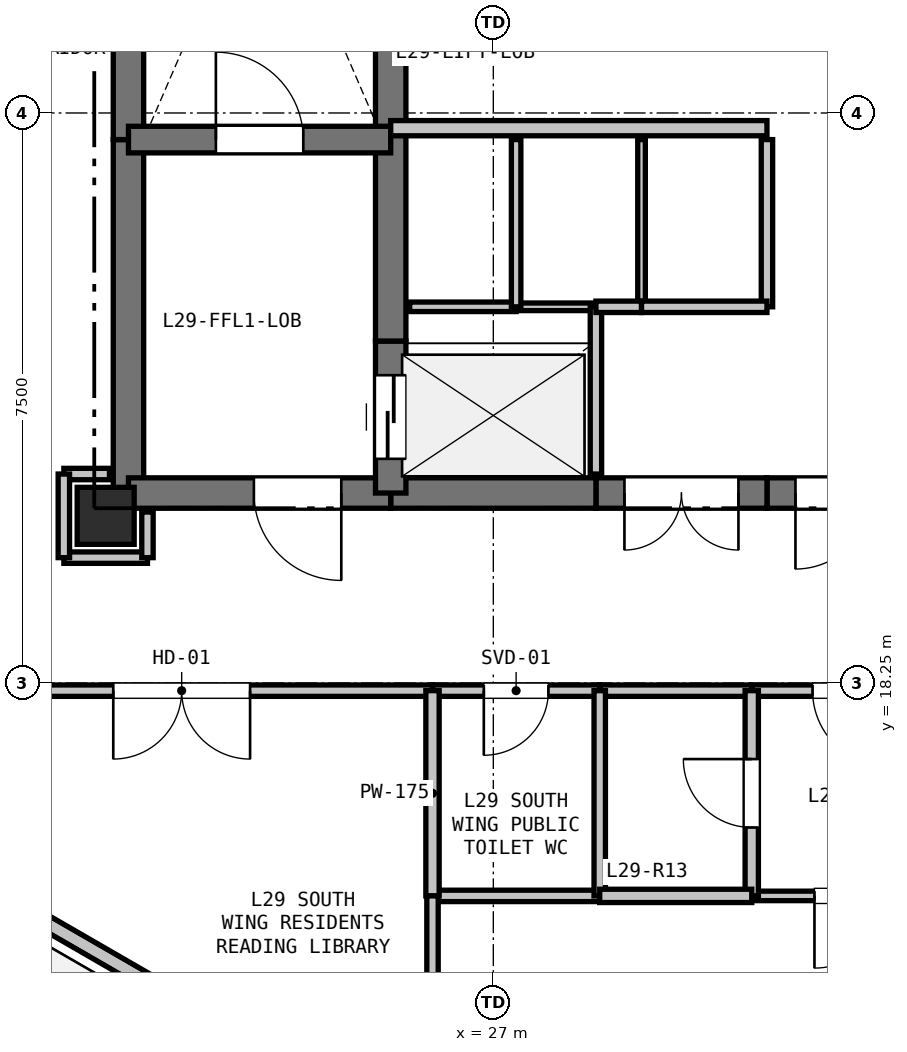
"""IFC4 building model, lengths in metres.
Left out: names, types, materials, properties, quantities, classifications, styles, units other than length and angle.
Written with IfcOpenShell. Run it as: python <this file> out.ifc"""

import sys

from ifc_helpers import new_model, si_unit, direction, frame, frame_2d, origin, origin_2d, place, context, subcontext, project, spatial, rectangle, extrude, element, fill, save


model = new_model("IFC4")
c1 = context("Model", 3, precision=1e-05, world=origin(), true_north=direction((0.0, 1.0)))
c2 = subcontext(c1, "Body", "Model", "MODEL_VIEW")
j1 = project(units=[si_unit("LENGTHUNIT", "METRE"), si_unit("PLANEANGLEUNIT", "RADIAN")], contexts=[c1])
p1 = place(None, origin())
s1 = spatial("IfcSite", under=j1, at=p1, CompositionType="ELEMENT")
p2 = place(p1, origin())
s2 = spatial("IfcBuilding", under=s1, at=p2, CompositionType="ELEMENT")
p3 = place(p2, frame((0.0, 0.0, 106.5)))
s3 = spatial("IfcBuildingStorey", under=s2, at=p3, CompositionType="ELEMENT", Elevation=106.5)
p4 = place(p3, frame((21.9, 20.45, 0.0), z_axis=(0.0, 0.0, 1.0), x_axis=(1.0, 0.0, 0.0)))
e1 = element("IfcColumn", 1, at=p4, inside=s3, PredefinedType="COLUMN", context=c2, shape_type="SweptSolid", body=[
    extrude(rectangle(XDim=0.75, YDim=0.75, at=origin_2d()), origin(), (0.0, 0.0, 1.0), 3.3),
])
p5 = place(p3, frame((26.845, 11.788, 0.0), z_axis=(0.0, 0.0, 1.0), x_axis=(-0.866027010039, 0.499997217876, 0.0)))
e2 = element("IfcWall", 2, at=p5, inside=s3, PredefinedType="PARAPET", context=c2, shape_type="SweptSolid", body=[
    extrude(rectangle(XDim=11.229, YDim=0.2, at=frame_2d((5.615, 0.0))), origin(), (0.0, 0.0, 1.0), 0.2),
])
p6 = place(p3, frame((22.2, 20.75, 0.0), z_axis=(0.0, 0.0, 1.0), x_axis=(0.0, 1.0, 0.0)))
e3 = element("IfcWall", 3, at=p6, inside=s3, PredefinedType="SHEAR", context=c2, shape_type="SweptSolid", body=[
    extrude(rectangle(XDim=4.65, YDim=0.4, at=frame_2d((2.325, 0.0))), origin(), (0.0, 0.0, 1.0), 3.05),
])
p7 = place(p3, frame((22.2, 25.4, 0.0), z_axis=(0.0, 0.0, 1.0), x_axis=(0.0, 1.0, 0.0)))
e4 = element("IfcWall", 4, at=p7, inside=s3, PredefinedType="SHEAR", context=c2, shape_type="SweptSolid", body=[
    extrude(rectangle(XDim=7.35, YDim=0.4, at=frame_2d((3.675, 0.0))), origin(), (0.0, 0.0, 1.0), 3.05),
])
p8 = place(p3, frame((32.35, 20.75, 0.0), z_axis=(0.0, 0.0, 1.0), x_axis=(-1.0, 0.0, 0.0)))
e5 = element("IfcWall", 5, at=p8, inside=s3, PredefinedType="SHEAR", context=c2, shape_type="SweptSolid", body=[
    extrude(rectangle(XDim=1.75, YDim=0.4, at=frame_2d((0.875, 0.0))), origin(), (0.0, 0.0, 1.0), 3.05),
])
p9 = place(p8, frame((0.375, 0.0, 0.0)))
e6 = element("IfcOpeningElement", 6, at=p9, cuts=e5, PredefinedType="OPENING", context=c2, shape_type="SweptSolid", body=[
    extrude(rectangle(XDim=1.0, YDim=2.15, at=frame_2d((0.5, 1.075))), frame((0.0, 0.21, 0.0), z_axis=(0.0, -1.0, 0.0), x_axis=(1.0, 0.0, 0.0)), (0.0, 0.0, 1.0), 0.42),
])
p10 = place(p3, frame((30.6, 20.75, 0.0), z_axis=(0.0, 0.0, 1.0), x_axis=(-1.0, 0.0, 0.0)))
e7 = element("IfcWall", 7, at=p10, inside=s3, PredefinedType="SHEAR", context=c2, shape_type="SweptSolid", body=[
    extrude(rectangle(XDim=2.25, YDim=0.4, at=frame_2d((1.125, 0.0))), origin(), (0.0, 0.0, 1.0), 3.05),
])
p11 = place(p10, frame((0.375, 0.0, 0.0)))
e8 = element("IfcOpeningElement", 8, at=p11, cuts=e7, PredefinedType="OPENING", context=c2, shape_type="SweptSolid", body=[
    extrude(rectangle(XDim=1.5, YDim=2.2, at=frame_2d((0.75, 1.1))), frame((0.0, 0.21, 0.0), z_axis=(0.0, -1.0, 0.0), x_axis=(1.0, 0.0, 0.0)), (0.0, 0.0, 1.0), 0.42),
])
p12 = place(p3, frame((28.35, 20.75, 0.0), z_axis=(0.0, 0.0, 1.0), x_axis=(-1.0, 0.0, 0.0)))
e9 = element("IfcWall", 9, at=p12, inside=s3, PredefinedType="SHEAR", context=c2, shape_type="SweptSolid", body=[
    extrude(rectangle(XDim=2.7, YDim=0.4, at=frame_2d((1.35, 0.0))), origin(), (0.0, 0.0, 1.0), 3.05),
])
p13 = place(p3, frame((25.65, 20.75, 0.0), z_axis=(0.0, 0.0, 1.0), x_axis=(-1.0, 0.0, 0.0)))
e10 = element("IfcWall", 10, at=p13, inside=s3, PredefinedType="SHEAR", context=c2, shape_type="SweptSolid", body=[
    extrude(rectangle(XDim=3.45, YDim=0.4, at=frame_2d((1.725, 0.0))), origin(), (0.0, 0.0, 1.0), 3.05),
])
p14 = place(p13, frame((0.65, 0.0, 0.0)))
e11 = element("IfcOpeningElement", 11, at=p14, cuts=e10, PredefinedType="OPENING", context=c2, shape_type="SweptSolid", body=[
    extrude(rectangle(XDim=1.15, YDim=2.15, at=frame_2d((0.575, 1.075))), frame((0.0, 0.21, 0.0), z_axis=(0.0, -1.0, 0.0), x_axis=(1.0, 0.0, 0.0)), (0.0, 0.0, 1.0), 0.42),
])
p15 = place(p3, frame((25.65, 20.75, 0.0), z_axis=(0.0, 0.0, 1.0), x_axis=(0.0, 1.0, 0.0)))
e12 = element("IfcWall", 12, at=p15, inside=s3, PredefinedType="SHEAR", context=c2, shape_type="SweptSolid", body=[
    extrude(rectangle(XDim=2.0, YDim=0.4, at=frame_2d((1.0, 0.0))), origin(), (0.0, 0.0, 1.0), 3.05),
])
p16 = place(p15, frame((0.45, 0.0, 0.0)))
e13 = element("IfcOpeningElement", 13, at=p16, cuts=e12, PredefinedType="OPENING", context=c2, shape_type="SweptSolid", body=[
    extrude(rectangle(XDim=1.1, YDim=2.15, at=frame_2d((0.55, 1.075))), frame((0.0, 0.21, 0.0), z_axis=(0.0, -1.0, 0.0), x_axis=(1.0, 0.0, 0.0)), (0.0, 0.0, 1.0), 0.42),
])
p17 = place(p3, frame((25.65, 22.75, 0.0), z_axis=(0.0, 0.0, 1.0), x_axis=(0.0, 1.0, 0.0)))
e14 = element("IfcWall", 14, at=p17, inside=s3, PredefinedType="SHEAR", context=c2, shape_type="SweptSolid", body=[
    extrude(rectangle(XDim=2.8, YDim=0.4, at=frame_2d((1.4, 0.0))), origin(), (0.0, 0.0, 1.0), 3.05),
])
p18 = place(p3, frame((25.65, 25.55, 0.0), z_axis=(0.0, 0.0, 1.0), x_axis=(0.0, 1.0, 0.0)))
e15 = element("IfcWall", 15, at=p18, inside=s3, PredefinedType="SHEAR", context=c2, shape_type="SweptSolid", body=[
    extrude(rectangle(XDim=2.4, YDim=0.4, at=frame_2d((1.2, 0.0))), origin(), (0.0, 0.0, 1.0), 3.05),
])
p19 = place(p3, frame((22.2, 25.4, 0.0), z_axis=(0.0, 0.0, 1.0), x_axis=(1.0, 0.0, 0.0)))
e16 = element("IfcWall", 16, at=p19, inside=s3, PredefinedType="SHEAR", context=c2, shape_type="SweptSolid", body=[
    extrude(rectangle(XDim=3.45, YDim=0.35, at=frame_2d((1.725, 0.0))), origin(), (0.0, 0.0, 1.0), 3.05),
])
p20 = place(p19, frame((1.15, 0.0, 0.0)))
e17 = element("IfcOpeningElement", 17, at=p20, cuts=e16, PredefinedType="OPENING", context=c2, shape_type="SweptSolid", body=[
    extrude(rectangle(XDim=1.15, YDim=2.15, at=frame_2d((0.575, 1.075))), frame((0.0, 0.185, 0.0), z_axis=(0.0, -1.0, 0.0), x_axis=(1.0, 0.0, 0.0)), (0.0, 0.0, 1.0), 0.37),
])
p21 = place(p3, frame((25.65, 25.55, 0.0), z_axis=(0.0, 0.0, 1.0), x_axis=(1.0, 0.0, 0.0)))
e18 = element("IfcWall", 18, at=p21, inside=s3, PredefinedType="PARTITIONING", context=c2, shape_type="SweptSolid", body=[
    extrude(rectangle(XDim=4.95, YDim=0.2, at=frame_2d((2.475, 0.0))), origin(), (0.0, 0.0, 1.0), 3.05),
])
p22 = place(p3, frame((25.9, 23.2, 0.0), z_axis=(0.0, 0.0, 1.0), x_axis=(1.0, 0.0, 0.0)))
e19 = element("IfcWall", 19, at=p22, inside=s3, PredefinedType="PARTITIONING", context=c2, shape_type="SweptSolid", body=[
    extrude(rectangle(XDim=1.4, YDim=0.125, at=frame_2d((0.7, 0.0))), origin(), (0.0, 0.0, 1.0), 3.05),
])
p23 = place(p3, frame((27.3, 23.2, 0.0), z_axis=(0.0, 0.0, 1.0), x_axis=(1.0, 0.0, 0.0)))
e20 = element("IfcWall", 20, at=p23, inside=s3, PredefinedType="PARTITIONING", context=c2, shape_type="SweptSolid", body=[
    extrude(rectangle(XDim=1.05, YDim=0.1, at=frame_2d((0.525, 0.0))), origin(), (0.0, 0.0, 1.0), 3.05),
])
p24 = place(p3, frame((28.35, 23.2, 0.0), z_axis=(0.0, 0.0, 1.0), x_axis=(0.0, -1.0, 0.0)))
e21 = element("IfcWall", 21, at=p24, inside=s3, PredefinedType="PARTITIONING", context=c2, shape_type="SweptSolid", body=[
    extrude(rectangle(XDim=2.2, YDim=0.15, at=frame_2d((1.1, 0.0))), origin(), (0.0, 0.0, 1.0), 3.05),
])
p25 = place(p3, frame((27.3, 25.4, 0.0), z_axis=(0.0, 0.0, 1.0), x_axis=(0.0, -1.0, 0.0)))
e22 = element("IfcWall", 22, at=p25, inside=s3, PredefinedType="PARTITIONING", context=c2, shape_type="SweptSolid", body=[
    extrude(rectangle(XDim=2.2, YDim=0.125, at=frame_2d((1.1, 0.0))), origin(), (0.0, 0.0, 1.0), 3.05),
])
p26 = place(p3, frame((28.95, 25.4, 0.0), z_axis=(0.0, 0.0, 1.0), x_axis=(0.0, -1.0, 0.0)))
e23 = element("IfcWall", 23, at=p26, inside=s3, PredefinedType="PARTITIONING", context=c2, shape_type="SweptSolid", body=[
    extrude(rectangle(XDim=2.2, YDim=0.1, at=frame_2d((1.1, 0.0))), origin(), (0.0, 0.0, 1.0), 3.05),
])
p27 = place(p3, frame((28.95, 23.2, 0.0), z_axis=(0.0, 0.0, 1.0), x_axis=(-1.0, 0.0, 0.0)))
e24 = element("IfcWall", 24, at=p27, inside=s3, PredefinedType="PARTITIONING", context=c2, shape_type="SweptSolid", body=[
    extrude(rectangle(XDim=0.6, YDim=0.15, at=frame_2d((0.3, 0.0))), origin(), (0.0, 0.0, 1.0), 3.05),
])
p28 = place(p3, frame((30.6, 25.4, 0.0), z_axis=(0.0, 0.0, 1.0), x_axis=(0.0, -1.0, 0.0)))
e25 = element("IfcWall", 25, at=p28, inside=s3, PredefinedType="PARTITIONING", context=c2, shape_type="SweptSolid", body=[
    extrude(rectangle(XDim=2.2, YDim=0.15, at=frame_2d((1.1, 0.0))), origin(), (0.0, 0.0, 1.0), 3.05),
])
p29 = place(p3, frame((30.6, 23.2, 0.0), z_axis=(0.0, 0.0, 1.0), x_axis=(-1.0, 0.0, 0.0)))
e26 = element("IfcWall", 26, at=p29, inside=s3, PredefinedType="PARTITIONING", context=c2, shape_type="SweptSolid", body=[
    extrude(rectangle(XDim=1.65, YDim=0.15, at=frame_2d((0.825, 0.0))), origin(), (0.0, 0.0, 1.0), 3.05),
])
p30 = place(p3, frame((21.35, 19.9, 0.0), z_axis=(0.0, 0.0, 1.0), x_axis=(1.0, 0.0, 0.0)))
e27 = element("IfcWall", 27, at=p30, inside=s3, PredefinedType="PARTITIONING", context=c2, shape_type="SweptSolid", body=[
    extrude(rectangle(XDim=1.1, YDim=0.15, at=frame_2d((0.55, 0.0))), origin(), (0.0, 0.0, 1.0), 2.423),
])
p31 = place(p3, frame((22.45, 19.9, 0.0), z_axis=(0.0, 0.0, 1.0), x_axis=(0.0, 1.0, 0.0)))
e28 = element("IfcWall", 28, at=p31, inside=s3, PredefinedType="PARTITIONING", context=c2, shape_type="SweptSolid", body=[
    extrude(rectangle(XDim=0.6, YDim=0.15, at=frame_2d((0.3, 0.0))), origin(), (0.0, 0.0, 1.0), 2.423),
])
p32 = place(p3, frame((33.0, 18.15, 0.0), z_axis=(0.0, 0.0, 1.0), x_axis=(-1.0, 0.0, 0.0)))
e29 = element("IfcWall", 29, at=p32, inside=s3, PredefinedType="PARTITIONING", context=c2, shape_type="SweptSolid", body=[
    extrude(rectangle(XDim=2.6, YDim=0.15, at=frame_2d((1.3, 0.0))), origin(), (0.0, 0.0, 1.0), 3.05),
])
p33 = place(p32, frame((0.8, 0.0, 0.0)))
e30 = element("IfcOpeningElement", 30, at=p33, cuts=e29, PredefinedType="OPENING", context=c2, shape_type="SweptSolid", body=[
    extrude(rectangle(XDim=1.0, YDim=2.15, at=frame_2d((0.5, 1.075))), frame((0.0, 0.085, 0.0), z_axis=(0.0, -1.0, 0.0), x_axis=(1.0, 0.0, 0.0)), (0.0, 0.0, 1.0), 0.17),
])
p34 = place(p3, frame((30.4, 18.15, 0.0), z_axis=(0.0, 0.0, 1.0), x_axis=(-1.0, 0.0, 0.0)))
e31 = element("IfcWall", 31, at=p34, inside=s3, PredefinedType="PARTITIONING", context=c2, shape_type="SweptSolid", body=[
    extrude(rectangle(XDim=2.0, YDim=0.15, at=frame_2d((1.0, 0.0))), origin(), (0.0, 0.0, 1.0), 3.05),
])
p35 = place(p3, frame((28.4, 18.15, 0.0), z_axis=(0.0, 0.0, 1.0), x_axis=(-1.0, 0.0, 0.0)))
e32 = element("IfcWall", 32, at=p35, inside=s3, PredefinedType="PARTITIONING", context=c2, shape_type="SweptSolid", body=[
    extrude(rectangle(XDim=2.2, YDim=0.15, at=frame_2d((1.1, 0.0))), origin(), (0.0, 0.0, 1.0), 3.05),
])
p36 = place(p35, frame((0.675, 0.0, 0.0)))
e33 = element("IfcOpeningElement", 33, at=p36, cuts=e32, PredefinedType="OPENING", context=c2, shape_type="SweptSolid", body=[
    extrude(rectangle(XDim=0.85, YDim=2.1, at=frame_2d((0.425, 1.05))), frame((0.0, 0.085, 0.0), z_axis=(0.0, -1.0, 0.0), x_axis=(1.0, 0.0, 0.0)), (0.0, 0.0, 1.0), 0.17),
])
p37 = place(p3, frame((26.2, 18.15, 0.0), z_axis=(0.0, 0.0, 1.0), x_axis=(-1.0, 0.0, 0.0)))
e34 = element("IfcWall", 34, at=p37, inside=s3, PredefinedType="PARTITIONING", context=c2, shape_type="SweptSolid", body=[
    extrude(rectangle(XDim=6.6, YDim=0.15, at=frame_2d((3.3, 0.0))), origin(), (0.0, 0.0, 1.0), 2.423),
])
p38 = place(p37, frame((2.4, 0.0, 0.0)))
e35 = element("IfcOpeningElement", 35, at=p38, cuts=e34, PredefinedType="OPENING", context=c2, shape_type="SweptSolid", body=[
    extrude(rectangle(XDim=1.8, YDim=2.2, at=frame_2d((0.9, 1.1))), frame((0.0, 0.085, 0.0), z_axis=(0.0, -1.0, 0.0), x_axis=(1.0, 0.0, 0.0)), (0.0, 0.0, 1.0), 0.17),
])
p39 = place(p3, frame((21.95, 21.0, 0.0), z_axis=(0.0, 0.0, 1.0), x_axis=(-1.0, 0.0, 0.0)))
e36 = element("IfcWall", 36, at=p39, inside=s3, PredefinedType="PARTITIONING", context=c2, shape_type="SweptSolid", body=[
    extrude(rectangle(XDim=0.6, YDim=0.15, at=frame_2d((0.3, 0.0))), origin(), (0.0, 0.0, 1.0), 2.498),
])
p40 = place(p3, frame((21.35, 21.0, 0.0), z_axis=(0.0, 0.0, 1.0), x_axis=(0.0, -1.0, 0.0)))
e37 = element("IfcWall", 37, at=p40, inside=s3, PredefinedType="PARTITIONING", context=c2, shape_type="SweptSolid", body=[
    extrude(rectangle(XDim=1.1, YDim=0.15, at=frame_2d((0.55, 0.0))), origin(), (0.0, 0.0, 1.0), 2.423),
])
p41 = place(p3, frame((33.0, 15.45, 0.0), z_axis=(0.0, 0.0, 1.0), x_axis=(-1.0, 0.0, 0.0)))
e38 = element("IfcWall", 38, at=p41, inside=s3, PredefinedType="PARTITIONING", context=c2, shape_type="SweptSolid", body=[
    extrude(rectangle(XDim=2.6, YDim=0.125, at=frame_2d((1.3, 0.0))), origin(), (0.0, 0.0, 1.0), 3.05),
])
p42 = place(p41, frame((0.825, 0.0, 0.0)))
e39 = element("IfcOpeningElement", 39, at=p42, cuts=e38, PredefinedType="OPENING", context=c2, shape_type="SweptSolid", body=[
    extrude(rectangle(XDim=0.95, YDim=2.1, at=frame_2d((0.475, 1.05))), frame((0.0, 0.073, 0.0), z_axis=(0.0, -1.0, 0.0), x_axis=(1.0, 0.0, 0.0)), (0.0, 0.0, 1.0), 0.145),
])
p43 = place(p3, frame((30.4, 15.45, 0.0), z_axis=(0.0, 0.0, 1.0), x_axis=(0.0, 1.0, 0.0)))
e40 = element("IfcWall", 40, at=p43, inside=s3, PredefinedType="PLUMBINGWALL", context=c2, shape_type="SweptSolid", body=[
    extrude(rectangle(XDim=2.7, YDim=0.175, at=frame_2d((1.35, 0.0))), origin(), (0.0, 0.0, 1.0), 3.05),
])
p44 = place(p43, frame((0.9, 0.0, 0.0)))
e41 = element("IfcOpeningElement", 41, at=p44, cuts=e40, PredefinedType="OPENING", context=c2, shape_type="SweptSolid", body=[
    extrude(rectangle(XDim=0.9, YDim=2.1, at=frame_2d((0.45, 1.05))), frame((0.0, 0.097, 0.0), z_axis=(0.0, -1.0, 0.0), x_axis=(1.0, 0.0, 0.0)), (0.0, 0.0, 1.0), 0.195),
])
p45 = place(p3, frame((28.4, 15.45, 0.0), z_axis=(0.0, 0.0, 1.0), x_axis=(-1.0, 0.0, 0.0)))
e42 = element("IfcWall", 42, at=p45, inside=s3, PredefinedType="PARTITIONING", context=c2, shape_type="SweptSolid", body=[
    extrude(rectangle(XDim=2.2, YDim=0.15, at=frame_2d((1.1, 0.0))), origin(), (0.0, 0.0, 1.0), 2.423),
])
p46 = place(p3, frame((26.2, 15.45, 0.0), z_axis=(0.0, 0.0, 1.0), x_axis=(0.0, 1.0, 0.0)))
e43 = element("IfcWall", 43, at=p46, inside=s3, PredefinedType="PLUMBINGWALL", context=c2, shape_type="SweptSolid", body=[
    extrude(rectangle(XDim=2.7, YDim=0.175, at=frame_2d((1.35, 0.0))), origin(), (0.0, 0.0, 1.0), 2.423),
])
p47 = place(p3, frame((28.4, 18.15, 0.0), z_axis=(0.0, 0.0, 1.0), x_axis=(0.0, -1.0, 0.0)))
e44 = element("IfcWall", 44, at=p47, inside=s3, PredefinedType="PARTITIONING", context=c2, shape_type="SweptSolid", body=[
    extrude(rectangle(XDim=2.7, YDim=0.15, at=frame_2d((1.35, 0.0))), origin(), (0.0, 0.0, 1.0), 3.05),
])
p48 = place(p3, frame((30.4, 15.45, 0.0), z_axis=(0.0, 0.0, 1.0), x_axis=(-1.0, 0.0, 0.0)))
e45 = element("IfcWall", 45, at=p48, inside=s3, PredefinedType="PLUMBINGWALL", context=c2, shape_type="SweptSolid", body=[
    extrude(rectangle(XDim=2.0, YDim=0.175, at=frame_2d((1.0, 0.0))), origin(), (0.0, 0.0, 1.0), 3.05),
])
p49 = place(p3, frame((26.2, 15.45, 0.0), z_axis=(0.0, 0.0, 1.0), x_axis=(0.0, -1.0, 0.0)))
e46 = element("IfcWall", 46, at=p49, inside=s3, PredefinedType="PARTITIONING", context=c2, shape_type="SweptSolid", body=[
    extrude(rectangle(XDim=3.248, YDim=0.15, at=frame_2d((1.624, 0.0))), origin(), (0.0, 0.0, 1.0), 2.365),
])
p50 = place(p9, origin())
e47 = element("IfcDoor", 47, at=p50, inside=s3, OperationType="SINGLE_SWING_RIGHT", PredefinedType="DOOR", context=c2, shape_type="SweptSolid", body=[
    extrude(rectangle(XDim=1.0, YDim=2.15, at=frame_2d((0.5, 1.075))), frame((0.0, 0.025, 0.0), z_axis=(0.0, -1.0, 0.0), x_axis=(1.0, 0.0, 0.0)), (0.0, 0.0, 1.0), 0.05),
])
fill(e6, e47)
p51 = place(p16, origin())
e48 = element("IfcDoor", 48, at=p51, inside=s3, OperationType="SLIDING_TO_LEFT", PredefinedType="DOOR", context=c2, shape_type="SweptSolid", body=[
    extrude(rectangle(XDim=1.1, YDim=2.15, at=frame_2d((0.55, 1.075))), frame((0.0, 0.025, 0.0), z_axis=(0.0, -1.0, 0.0), x_axis=(1.0, 0.0, 0.0)), (0.0, 0.0, 1.0), 0.05),
])
fill(e13, e48)
p52 = place(p20, origin())
e49 = element("IfcDoor", 49, at=p52, inside=s3, OperationType="SINGLE_SWING_LEFT", PredefinedType="DOOR", context=c2, shape_type="SweptSolid", body=[
    extrude(rectangle(XDim=1.15, YDim=2.15, at=frame_2d((0.575, 1.075))), frame((0.0, 0.025, 0.0), z_axis=(0.0, -1.0, 0.0), x_axis=(1.0, 0.0, 0.0)), (0.0, 0.0, 1.0), 0.05),
])
fill(e17, e49)
p53 = place(p14, origin())
e50 = element("IfcDoor", 50, at=p53, inside=s3, OperationType="SINGLE_SWING_LEFT", PredefinedType="DOOR", context=c2, shape_type="SweptSolid", body=[
    extrude(rectangle(XDim=1.15, YDim=2.15, at=frame_2d((0.575, 1.075))), frame((0.0, 0.025, 0.0), z_axis=(0.0, -1.0, 0.0), x_axis=(1.0, 0.0, 0.0)), (0.0, 0.0, 1.0), 0.05),
])
fill(e11, e50)
p54 = place(p11, origin())
e51 = element("IfcDoor", 51, at=p54, inside=s3, OperationType="DOUBLE_DOOR_SINGLE_SWING", PredefinedType="DOOR", context=c2, shape_type="SweptSolid", body=[
    extrude(rectangle(XDim=1.5, YDim=2.2, at=frame_2d((0.75, 1.1))), frame((0.0, 0.025, 0.0), z_axis=(0.0, -1.0, 0.0), x_axis=(1.0, 0.0, 0.0)), (0.0, 0.0, 1.0), 0.05),
])
fill(e8, e51)
p55 = place(p33, origin())
e52 = element("IfcDoor", 52, at=p55, inside=s3, OperationType="SINGLE_SWING_LEFT", PredefinedType="DOOR", context=c2, shape_type="SweptSolid", body=[
    extrude(rectangle(XDim=1.0, YDim=2.15, at=frame_2d((0.5, 1.075))), frame((0.0, 0.025, 0.0), z_axis=(0.0, -1.0, 0.0), x_axis=(1.0, 0.0, 0.0)), (0.0, 0.0, 1.0), 0.05),
])
fill(e30, e52)
p56 = place(p36, origin())
e53 = element("IfcDoor", 53, at=p56, inside=s3, OperationType="SINGLE_SWING_RIGHT", PredefinedType="DOOR", context=c2, shape_type="SweptSolid", body=[
    extrude(rectangle(XDim=0.85, YDim=2.1, at=frame_2d((0.425, 1.05))), frame((0.0, 0.025, 0.0), z_axis=(0.0, -1.0, 0.0), x_axis=(1.0, 0.0, 0.0)), (0.0, 0.0, 1.0), 0.05),
])
fill(e33, e53)
p57 = place(p38, origin())
e54 = element("IfcDoor", 54, at=p57, inside=s3, OperationType="DOUBLE_DOOR_SINGLE_SWING", PredefinedType="DOOR", context=c2, shape_type="SweptSolid", body=[
    extrude(rectangle(XDim=1.8, YDim=2.2, at=frame_2d((0.9, 1.1))), frame((0.0, 0.025, 0.0), z_axis=(0.0, -1.0, 0.0), x_axis=(1.0, 0.0, 0.0)), (0.0, 0.0, 1.0), 0.05),
])
fill(e35, e54)
p58 = place(p44, origin())
e55 = element("IfcDoor", 55, at=p58, inside=s3, OperationType="SINGLE_SWING_RIGHT", PredefinedType="DOOR", context=c2, shape_type="SweptSolid", body=[
    extrude(rectangle(XDim=0.9, YDim=2.1, at=frame_2d((0.45, 1.05))), frame((0.0, 0.025, 0.0), z_axis=(0.0, -1.0, 0.0), x_axis=(1.0, 0.0, 0.0)), (0.0, 0.0, 1.0), 0.05),
])
fill(e41, e55)
p59 = place(p42, origin())
e56 = element("IfcDoor", 56, at=p59, inside=s3, OperationType="SINGLE_SWING_RIGHT", PredefinedType="DOOR", context=c2, shape_type="SweptSolid", body=[
    extrude(rectangle(XDim=0.95, YDim=2.1, at=frame_2d((0.475, 1.05))), frame((0.0, 0.025, 0.0), z_axis=(0.0, -1.0, 0.0), x_axis=(1.0, 0.0, 0.0)), (0.0, 0.0, 1.0), 0.05),
])
fill(e39, e56)
save(model, sys.argv[1])
